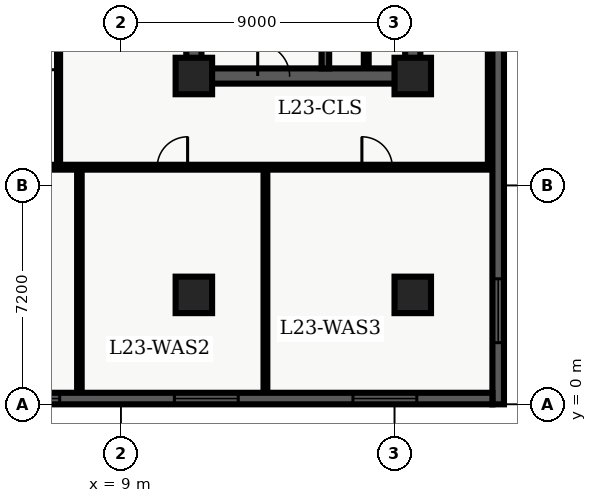
"""IFC4 building model, lengths in metres.
Left out: names, types, materials, properties, quantities, classifications, styles, units other than length and angle.
Written with IfcOpenShell. Run it as: python <this file> out.ifc"""

import sys

from ifc_helpers import new_model, entity, si_unit, converted_unit, direction, frame, origin_with_axes, origin_2d_with_axis, place, context, subcontext, project, spatial, polyline, rectangle, outline, extrude, element, fill, save


model = new_model("IFC4")
c1 = context("Model", 3, precision=1e-05, world=origin_with_axes(), true_north=direction((0.0, 1.0)))
c2 = subcontext(c1, "Body", "Model", "MODEL_VIEW")
j1 = project(units=[si_unit("LENGTHUNIT", "METRE"), converted_unit("PLANEANGLEUNIT", "DEGREE", entity("IfcPlaneAngleMeasure", 0.017), si_unit("PLANEANGLEUNIT", "RADIAN"), dimensions=[0, 0, 0, 0, 0, 0, 0])], contexts=[c1])
p1 = place(None, origin_with_axes())
s1 = spatial("IfcSite", under=j1, at=p1, CompositionType="ELEMENT")
p2 = place(p1, origin_with_axes())
s2 = spatial("IfcBuilding", under=s1, at=p2, CompositionType="ELEMENT")
p3 = place(p2, frame((0.0, 0.0, 96.9), z_axis=(0.0, 0.0, 1.0), x_axis=(1.0, 0.0, 0.0)))
s3 = spatial("IfcBuildingStorey", under=s2, at=p3, CompositionType="ELEMENT", Elevation=96.9)
p4 = place(p3, frame((11.4, 10.8, 0.0), z_axis=(0.0, 0.0, 1.0), x_axis=(0.0, 1.0, 0.0)))
e1 = element("IfcWall", 1, at=p4, inside=s3, PredefinedType="SHEAR", context=c2, shape_type="SweptSolid", body=[
    extrude(outline(polyline([(0.0, -0.25), (27.0, -0.25), (27.0, 0.25), (0.0, 0.25), (0.0, -0.25)])), origin_with_axes(), (0.0, 0.0, 1.0), 3.66),
])
p5 = place(p3, frame((11.4, 10.8, 0.0), z_axis=(0.0, 0.0, 1.0), x_axis=(1.0, 0.0, 0.0)))
e2 = element("IfcWall", 2, at=p5, inside=s3, PredefinedType="SHEAR", context=c2, shape_type="SweptSolid", body=[
    extrude(outline(polyline([(0.0, -0.25), (7.2, -0.25), (7.2, 0.25), (0.0, 0.25), (0.0, -0.25)])), origin_with_axes(), (0.0, 0.0, 1.0), 3.66),
])
p6 = place(p5, frame((2.625, 0.0, 0.0), z_axis=(0.0, 0.0, 1.0), x_axis=(1.0, 0.0, 0.0)))
e3 = element("IfcOpeningElement", 3, at=p6, cuts=e2, PredefinedType="OPENING", context=c2, shape_type="SweptSolid", body=[
    extrude(rectangle(XDim=1.05, YDim=0.52, at=origin_2d_with_axis()), origin_with_axes(), (0.0, 0.0, 1.0), 2.15),
])
p7 = place(p3, frame((18.6, 10.8, 0.0), z_axis=(0.0, 0.0, 1.0), x_axis=(0.0, 1.0, 0.0)))
e4 = element("IfcWall", 4, at=p7, inside=s3, PredefinedType="SHEAR", context=c2, shape_type="SweptSolid", body=[
    extrude(outline(polyline([(0.0, -0.25), (13.5, -0.25), (13.5, 0.25), (0.0, 0.25), (0.0, -0.25)])), origin_with_axes(), (0.0, 0.0, 1.0), 3.66),
])
p8 = place(p7, frame((11.125, 0.0, 0.0), z_axis=(0.0, 0.0, 1.0), x_axis=(1.0, 0.0, 0.0)))
e5 = element("IfcOpeningElement", 5, at=p8, cuts=e4, PredefinedType="OPENING", context=c2, shape_type="SweptSolid", body=[
    extrude(rectangle(XDim=1.05, YDim=0.52, at=origin_2d_with_axis()), origin_with_axes(), (0.0, 0.0, 1.0), 2.15),
])
p9 = place(p7, frame((2.575, 0.0, 0.0), z_axis=(0.0, 0.0, 1.0), x_axis=(1.0, 0.0, 0.0)))
e6 = element("IfcOpeningElement", 6, at=p9, cuts=e4, PredefinedType="OPENING", context=c2, shape_type="SweptSolid", body=[
    extrude(rectangle(XDim=0.95, YDim=0.52, at=origin_2d_with_axis()), origin_with_axes(), (0.0, 0.0, 1.0), 2.15),
])
p10 = place(p3, frame((15.725, 11.05, 0.0), z_axis=(0.0, 0.0, 1.0), x_axis=(0.0, 1.0, 0.0)))
e7 = element("IfcWall", 7, at=p10, inside=s3, PredefinedType="SHEAR", context=c2, shape_type="SweptSolid", body=[
    extrude(outline(polyline([(0.0, -0.125), (8.65, -0.125), (8.65, 0.125), (0.0, 0.125), (0.0, -0.125)])), origin_with_axes(), (0.0, 0.0, 1.0), 3.66),
])
for number, where, z_axis, x_axis in (
    (8, (11.4, 3.6, 0.0), (0.0, 0.0, 1.0), (1.0, 0.0, 0.0)),
    (9, (11.4, 10.8, 0.0), (0.0, 0.0, 1.0), (1.0, 0.0, 0.0)),
    (10, (18.6, 3.6, 0.0), (0.0, 0.0, 1.0), (1.0, 0.0, 0.0)),
    (11, (18.6, 10.8, 0.0), (0.0, 0.0, 1.0), (1.0, 0.0, 0.0)),
):
    element("IfcColumn", number, at=place(p3, frame(where, z_axis=z_axis, x_axis=x_axis)), inside=s3, PredefinedType="COLUMN", context=c2, shape_type="SweptSolid", body=[
        extrude(rectangle(XDim=1.2, YDim=1.2, at=origin_2d_with_axis()), origin_with_axes(), (0.0, 0.0, 1.0), 3.9),
    ])
p11 = place(p3, frame((17.07, 11.1, 0.0), z_axis=(0.0, 0.0, 1.0), x_axis=(0.0, 1.0, 0.0)))
e12 = element("IfcWall", 12, at=p11, inside=s3, PredefinedType="PARTITIONING", context=c2, shape_type="SweptSolid", body=[
    extrude(outline(polyline([(0.0, -0.08), (4.1, -0.08), (4.1, 0.08), (0.0, 0.08), (0.0, -0.08)])), origin_with_axes(), (0.0, 0.0, 1.0), 2.7),
])
p12 = place(p11, frame((2.05, 0.0, 0.0), z_axis=(0.0, 0.0, 1.0), x_axis=(1.0, 0.0, 0.0)))
e13 = element("IfcOpeningElement", 13, at=p12, cuts=e12, PredefinedType="OPENING", context=c2, shape_type="SweptSolid", body=[
    extrude(rectangle(XDim=0.9, YDim=0.18, at=origin_2d_with_axis()), origin_with_axes(), (0.0, 0.0, 1.0), 2.15),
])
p13 = place(p3, frame((2.6, 7.8, 0.0), z_axis=(0.0, 0.0, 1.0), x_axis=(1.0, 0.0, 0.0)))
e14 = element("IfcWall", 14, at=p13, inside=s3, PredefinedType="PARTITIONING", context=c2, shape_type="SweptSolid", body=[
    extrude(outline(polyline([(0.0, -0.08), (18.625, -0.08), (18.625, 0.08), (0.0, 0.08), (0.0, -0.08)])), origin_with_axes(), (0.0, 0.0, 1.0), 2.7),
])
p14 = place(p13, frame((2.233, 0.0, 0.0), z_axis=(0.0, 0.0, 1.0), x_axis=(1.0, 0.0, 0.0)))
e15 = element("IfcOpeningElement", 15, at=p14, cuts=e14, PredefinedType="OPENING", context=c2, shape_type="SweptSolid", body=[
    extrude(rectangle(XDim=1.0, YDim=0.18, at=origin_2d_with_axis()), origin_with_axes(), (0.0, 0.0, 1.0), 2.15),
])
p15 = place(p13, frame((8.095, 0.0, 0.0), z_axis=(0.0, 0.0, 1.0), x_axis=(1.0, 0.0, 0.0)))
e16 = element("IfcOpeningElement", 16, at=p15, cuts=e14, PredefinedType="OPENING", context=c2, shape_type="SweptSolid", body=[
    extrude(rectangle(XDim=1.0, YDim=0.18, at=origin_2d_with_axis()), origin_with_axes(), (0.0, 0.0, 1.0), 2.15),
])
p16 = place(p13, frame((14.827, 0.0, 0.0), z_axis=(0.0, 0.0, 1.0), x_axis=(1.0, 0.0, 0.0)))
e17 = element("IfcOpeningElement", 17, at=p16, cuts=e14, PredefinedType="OPENING", context=c2, shape_type="SweptSolid", body=[
    extrude(rectangle(XDim=1.0, YDim=0.18, at=origin_2d_with_axis()), origin_with_axes(), (0.0, 0.0, 1.0), 2.15),
])
p17 = place(p3, frame((21.15, 7.8, 0.0), z_axis=(0.0, 0.0, 1.0), x_axis=(0.0, 1.0, 0.0)))
e18 = element("IfcWall", 18, at=p17, inside=s3, PredefinedType="PARTITIONING", context=c2, shape_type="SweptSolid", body=[
    extrude(outline(polyline([(0.0, -0.08), (32.7, -0.08), (32.7, 0.08), (0.0, 0.08), (0.0, -0.08)])), origin_with_axes(), (0.0, 0.0, 1.0), 2.7),
])
p18 = place(p3, frame((6.95, 7.8, 0.0), z_axis=(0.0, 0.0, 1.0), x_axis=(0.0, 1.0, 0.0)))
e19 = element("IfcWall", 19, at=p18, inside=s3, PredefinedType="PARTITIONING", context=c2, shape_type="SweptSolid", body=[
    extrude(outline(polyline([(0.0, -0.05), (32.7, -0.05), (32.7, 0.05), (0.0, 0.05), (0.0, -0.05)])), origin_with_axes(), (0.0, 0.0, 1.0), 2.7),
])
p19 = place(p18, frame((3.707, 0.0, 0.0), z_axis=(0.0, 0.0, 1.0), x_axis=(1.0, 0.0, 0.0)))
e20 = element("IfcOpeningElement", 20, at=p19, cuts=e19, PredefinedType="OPENING", context=c2, shape_type="SweptSolid", body=[
    extrude(rectangle(XDim=1.0, YDim=0.12, at=origin_2d_with_axis()), origin_with_axes(), (0.0, 0.0, 1.0), 2.15),
])
p20 = place(p18, frame((11.836, 0.0, 0.0), z_axis=(0.0, 0.0, 1.0), x_axis=(1.0, 0.0, 0.0)))
e21 = element("IfcOpeningElement", 21, at=p20, cuts=e19, PredefinedType="OPENING", context=c2, shape_type="SweptSolid", body=[
    extrude(rectangle(XDim=1.0, YDim=0.12, at=origin_2d_with_axis()), origin_with_axes(), (0.0, 0.0, 1.0), 2.15),
])
p21 = place(p18, frame((21.94, 0.0, 0.0), z_axis=(0.0, 0.0, 1.0), x_axis=(1.0, 0.0, 0.0)))
e22 = element("IfcOpeningElement", 22, at=p21, cuts=e19, PredefinedType="OPENING", context=c2, shape_type="SweptSolid", body=[
    extrude(rectangle(XDim=1.0, YDim=0.12, at=origin_2d_with_axis()), origin_with_axes(), (0.0, 0.0, 1.0), 2.15),
])
p22 = place(p18, frame((30.03, 0.0, 0.0), z_axis=(0.0, 0.0, 1.0), x_axis=(1.0, 0.0, 0.0)))
e23 = element("IfcOpeningElement", 23, at=p22, cuts=e19, PredefinedType="OPENING", context=c2, shape_type="SweptSolid", body=[
    extrude(rectangle(XDim=1.0, YDim=0.12, at=origin_2d_with_axis()), origin_with_axes(), (0.0, 0.0, 1.0), 2.15),
])
p23 = place(p3, frame((7.635, 0.36, 0.0), z_axis=(0.0, 0.0, 1.0), x_axis=(0.0, 1.0, 0.0)))
e24 = element("IfcWall", 24, at=p23, inside=s3, PredefinedType="PARTITIONING", context=c2, shape_type="SweptSolid", body=[
    extrude(outline(polyline([(0.0, -0.075), (7.34, -0.075), (7.34, 0.075), (0.0, 0.075), (0.0, -0.075)])), origin_with_axes(), (0.0, 0.0, 1.0), 2.7),
])
p24 = place(p3, frame((13.754, 0.36, 0.0), z_axis=(0.0, 0.0, 1.0), x_axis=(0.0, 1.0, 0.0)))
e25 = element("IfcWall", 25, at=p24, inside=s3, PredefinedType="PARTITIONING", context=c2, shape_type="SweptSolid", body=[
    extrude(outline(polyline([(0.0, -0.062), (7.34, -0.062), (7.34, 0.062), (0.0, 0.062), (0.0, -0.062)])), origin_with_axes(), (0.0, 0.0, 1.0), 2.7),
])
p25 = place(p3, frame((21.41, 45.82, 0.0), z_axis=(0.0, 0.0, 1.0), x_axis=(0.0, -1.0, 0.0)))
e26 = element("IfcWall", 26, at=p25, inside=s3, PredefinedType="SOLIDWALL", context=c2, shape_type="SweptSolid", body=[
    extrude(outline(polyline([(0.0, -0.19), (45.82, -0.19), (45.82, 0.19), (0.0, 0.19), (0.0, -0.19)])), origin_with_axes(), (0.0, 0.0, 1.0), 3.66),
])
p26 = place(p25, frame((3.079, 0.0, 0.45), z_axis=(0.0, 0.0, 1.0), x_axis=(1.0, 0.0, 0.0)))
e27 = element("IfcOpeningElement", 27, at=p26, cuts=e26, PredefinedType="OPENING", context=c2, shape_type="SweptSolid", body=[
    extrude(rectangle(XDim=2.1, YDim=0.4, at=origin_2d_with_axis()), origin_with_axes(), (0.0, 0.0, 1.0), 2.2),
])
p27 = place(p25, frame((42.741, 0.0, 0.45), z_axis=(0.0, 0.0, 1.0), x_axis=(1.0, 0.0, 0.0)))
e28 = element("IfcOpeningElement", 28, at=p27, cuts=e26, PredefinedType="OPENING", context=c2, shape_type="SweptSolid", body=[
    extrude(rectangle(XDim=2.1, YDim=0.4, at=origin_2d_with_axis()), origin_with_axes(), (0.0, 0.0, 1.0), 2.2),
])
p28 = place(p3, frame((21.22, 0.19, 0.0), z_axis=(0.0, 0.0, 1.0), x_axis=(-1.0, 0.0, 0.0)))
e29 = element("IfcWall", 29, at=p28, inside=s3, PredefinedType="SOLIDWALL", context=c2, shape_type="SweptSolid", body=[
    extrude(outline(polyline([(0.0, -0.19), (18.82, -0.19), (18.82, 0.19), (0.0, 0.19), (0.0, -0.19)])), origin_with_axes(), (0.0, 0.0, 1.0), 3.66),
])
p29 = place(p28, frame((3.537, 0.0, 0.45), z_axis=(0.0, 0.0, 1.0), x_axis=(1.0, 0.0, 0.0)))
e30 = element("IfcOpeningElement", 30, at=p29, cuts=e29, PredefinedType="OPENING", context=c2, shape_type="SweptSolid", body=[
    extrude(rectangle(XDim=2.1, YDim=0.4, at=origin_2d_with_axis()), origin_with_axes(), (0.0, 0.0, 1.0), 2.2),
])
p30 = place(p28, frame((9.41, 0.0, 0.45), z_axis=(0.0, 0.0, 1.0), x_axis=(1.0, 0.0, 0.0)))
e31 = element("IfcOpeningElement", 31, at=p30, cuts=e29, PredefinedType="OPENING", context=c2, shape_type="SweptSolid", body=[
    extrude(rectangle(XDim=2.1, YDim=0.4, at=origin_2d_with_axis()), origin_with_axes(), (0.0, 0.0, 1.0), 2.2),
])
p31 = place(p28, frame((15.283, 0.0, 0.45), z_axis=(0.0, 0.0, 1.0), x_axis=(1.0, 0.0, 0.0)))
e32 = element("IfcOpeningElement", 32, at=p31, cuts=e29, PredefinedType="OPENING", context=c2, shape_type="SweptSolid", body=[
    extrude(rectangle(XDim=2.1, YDim=0.4, at=origin_2d_with_axis()), origin_with_axes(), (0.0, 0.0, 1.0), 2.2),
])
p32 = place(p5, frame((2.625, 0.0, 0.0), z_axis=(0.0, 0.0, 1.0), x_axis=(1.0, 0.0, 0.0)))
e33 = element("IfcDoor", 33, at=p32, inside=s3, OperationType="SINGLE_SWING_LEFT", PredefinedType="DOOR", context=c2, shape_type="SweptSolid", body=[
    extrude(rectangle(XDim=1.05, YDim=0.09, at=origin_2d_with_axis()), origin_with_axes(), (0.0, 0.0, 1.0), 2.15),
])
fill(e3, e33)
p33 = place(p18, frame((3.707, 0.0, 0.0), z_axis=(0.0, 0.0, 1.0), x_axis=(1.0, 0.0, 0.0)))
e34 = element("IfcDoor", 34, at=p33, inside=s3, OperationType="SINGLE_SWING_LEFT", PredefinedType="DOOR", context=c2, shape_type="SweptSolid", body=[
    extrude(rectangle(XDim=1.0, YDim=0.06, at=origin_2d_with_axis()), origin_with_axes(), (0.0, 0.0, 1.0), 2.15),
])
fill(e20, e34)
p34 = place(p13, frame((8.095, 0.0, 0.0), z_axis=(0.0, 0.0, 1.0), x_axis=(1.0, 0.0, 0.0)))
e35 = element("IfcDoor", 35, at=p34, inside=s3, OperationType="SINGLE_SWING_RIGHT", PredefinedType="DOOR", context=c2, shape_type="SweptSolid", body=[
    extrude(rectangle(XDim=1.0, YDim=0.09, at=origin_2d_with_axis()), origin_with_axes(), (0.0, 0.0, 1.0), 2.15),
])
fill(e16, e35)
p35 = place(p13, frame((14.827, 0.0, 0.0), z_axis=(0.0, 0.0, 1.0), x_axis=(1.0, 0.0, 0.0)))
e36 = element("IfcDoor", 36, at=p35, inside=s3, OperationType="SINGLE_SWING_LEFT", PredefinedType="DOOR", context=c2, shape_type="SweptSolid", body=[
    extrude(rectangle(XDim=1.0, YDim=0.09, at=origin_2d_with_axis()), origin_with_axes(), (0.0, 0.0, 1.0), 2.15),
])
fill(e17, e36)
p36 = place(p25, frame((42.741, 0.0, 0.45), z_axis=(0.0, 0.0, 1.0), x_axis=(1.0, 0.0, 0.0)))
e37 = element("IfcWindow", 37, at=p36, inside=s3, PredefinedType="WINDOW", context=c2, shape_type="SweptSolid", body=[
    extrude(rectangle(XDim=2.1, YDim=0.09, at=origin_2d_with_axis()), origin_with_axes(), (0.0, 0.0, 1.0), 2.2),
])
fill(e28, e37)
p37 = place(p28, frame((3.537, 0.0, 0.45), z_axis=(0.0, 0.0, 1.0), x_axis=(1.0, 0.0, 0.0)))
e38 = element("IfcWindow", 38, at=p37, inside=s3, PredefinedType="WINDOW", context=c2, shape_type="SweptSolid", body=[
    extrude(rectangle(XDim=2.1, YDim=0.09, at=origin_2d_with_axis()), origin_with_axes(), (0.0, 0.0, 1.0), 2.2),
])
fill(e30, e38)
p38 = place(p28, frame((9.41, 0.0, 0.45), z_axis=(0.0, 0.0, 1.0), x_axis=(1.0, 0.0, 0.0)))
e39 = element("IfcWindow", 39, at=p38, inside=s3, PredefinedType="WINDOW", context=c2, shape_type="SweptSolid", body=[
    extrude(rectangle(XDim=2.1, YDim=0.09, at=origin_2d_with_axis()), origin_with_axes(), (0.0, 0.0, 1.0), 2.2),
])
fill(e31, e39)
p39 = place(p28, frame((15.283, 0.0, 0.45), z_axis=(0.0, 0.0, 1.0), x_axis=(1.0, 0.0, 0.0)))
e40 = element("IfcWindow", 40, at=p39, inside=s3, PredefinedType="WINDOW", context=c2, shape_type="SweptSolid", body=[
    extrude(rectangle(XDim=2.1, YDim=0.09, at=origin_2d_with_axis()), origin_with_axes(), (0.0, 0.0, 1.0), 2.2),
])
fill(e32, e40)
save(model, sys.argv[1])
